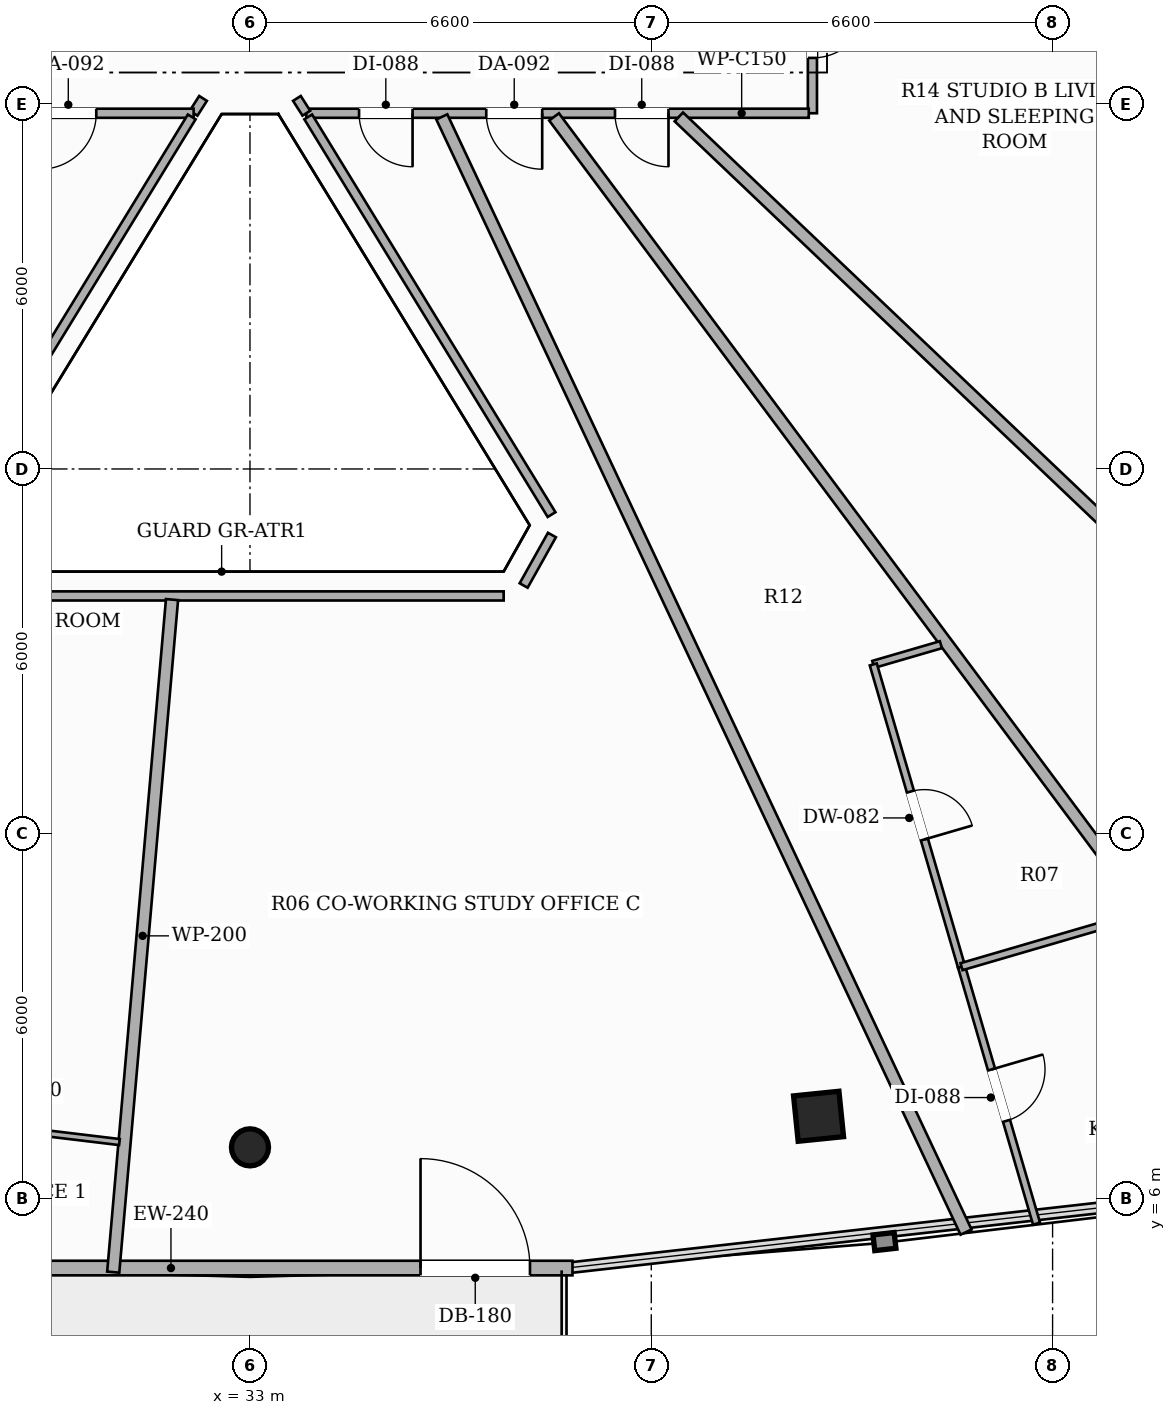
"""IFC4 building model, lengths in metres.
Left out: names, types, materials, properties, quantities, classifications, styles, units other than length and angle.
Written with IfcOpenShell. Run it as: python <this file> out.ifc"""

import sys

from ifc_helpers import new_model, si_unit, direction, frame, frame_2d, origin, origin_2d, place, context, subcontext, project, spatial, rectangle, hollow_rectangle, hollow_circle, extrude, element, fill, save


model = new_model("IFC4")
c1 = context("Model", 3, precision=1e-05, world=origin(), true_north=direction((0.0, 1.0)))
c2 = subcontext(c1, "Body", "Model", "MODEL_VIEW")
j1 = project(units=[si_unit("LENGTHUNIT", "METRE"), si_unit("PLANEANGLEUNIT", "RADIAN")], contexts=[c1])
p1 = place(None, origin())
s1 = spatial("IfcSite", under=j1, at=p1, CompositionType="ELEMENT")
p2 = place(p1, origin())
s2 = spatial("IfcBuilding", under=s1, at=p2, CompositionType="ELEMENT")
p3 = place(p2, frame((0.0, 0.0, 222.8)))
s3 = spatial("IfcBuildingStorey", under=s2, at=p3, CompositionType="ELEMENT", Elevation=222.8)
p4 = place(p3, frame((33.0, 6.844, 0.0), z_axis=(0.0, 0.0, 1.0), x_axis=(1.0, 0.0, 0.0)))
e1 = element("IfcColumn", 1, at=p4, inside=s3, PredefinedType="COLUMN", context=c2, shape_type="SweptSolid", body=[
    extrude(hollow_circle(Radius=0.305, WallThickness=0.016, at=origin_2d()), origin(), (0.0, 0.0, 1.0), 3.3),
])
p5 = place(p3, frame((42.351, 7.355, 0.0), z_axis=(0.0, 0.0, 1.0), x_axis=(0.994880708829, 0.101056297183, 0.0)))
e2 = element("IfcColumn", 2, at=p5, inside=s3, PredefinedType="COLUMN", context=c2, shape_type="SweptSolid", body=[
    extrude(hollow_rectangle(XDim=0.75, YDim=0.75, WallThickness=0.025, at=origin_2d()), origin(), (0.0, 0.0, 1.0), 3.3),
])
p6 = place(p3, frame((27.696, 4.859, 0.0), z_axis=(0.0, 0.0, 1.0), x_axis=(1.0, 0.0, 0.0)))
e3 = element("IfcWall", 3, at=p6, inside=s3, PredefinedType="SOLIDWALL", context=c2, shape_type="SweptSolid", body=[
    extrude(rectangle(XDim=10.608, YDim=0.24, at=frame_2d((5.304, 0.0))), origin(), (0.0, 0.0, 1.0), 2.624),
])
p7 = place(p6, frame((8.109, 0.0, 0.0)))
e4 = element("IfcOpeningElement", 4, at=p7, cuts=e3, PredefinedType="OPENING", context=c2, shape_type="SweptSolid", body=[
    extrude(rectangle(XDim=1.8, YDim=2.2, at=frame_2d((0.9, 1.1))), frame((0.0, 0.13, 0.0), z_axis=(0.0, -1.0, 0.0), x_axis=(1.0, 0.0, 0.0)), (0.0, 0.0, 1.0), 0.26),
])
p8 = place(p3, frame((32.228, 24.094, 0.0), z_axis=(0.0, 0.0, 1.0), x_axis=(-0.53643811989, -0.843939656331, 0.0)))
e5 = element("IfcWall", 5, at=p8, inside=s3, PredefinedType="PARTITIONING", context=c2, shape_type="SweptSolid", body=[
    extrude(rectangle(XDim=0.289, YDim=0.15, at=frame_2d((0.145, 0.0))), origin(), (0.0, 0.0, 1.0), 3.06),
])
p9 = place(p3, frame((32.073, 23.85, 0.0), z_axis=(0.0, 0.0, 1.0), x_axis=(-1.0, 0.0, 0.0)))
e6 = element("IfcWall", 6, at=p9, inside=s3, PredefinedType="PARTITIONING", context=c2, shape_type="SweptSolid", body=[
    extrude(rectangle(XDim=8.423, YDim=0.15, at=frame_2d((4.211, 0.0))), origin(), (0.0, 0.0, 1.0), 2.565),
])
p10 = place(p9, frame((1.601, 0.0, 0.0)))
e7 = element("IfcOpeningElement", 7, at=p10, cuts=e6, PredefinedType="OPENING", context=c2, shape_type="SweptSolid", body=[
    extrude(rectangle(XDim=0.92, YDim=2.15, at=frame_2d((0.46, 1.075))), frame((0.0, 0.085, 0.0), z_axis=(0.0, -1.0, 0.0), x_axis=(1.0, 0.0, 0.0)), (0.0, 0.0, 1.0), 0.17),
])
p11 = place(p9, frame((4.841, 0.0, 0.0)))
e8 = element("IfcOpeningElement", 8, at=p11, cuts=e6, PredefinedType="OPENING", context=c2, shape_type="SweptSolid", body=[
    extrude(rectangle(XDim=0.88, YDim=2.1, at=frame_2d((0.44, 1.05))), frame((0.0, 0.085, 0.0), z_axis=(0.0, -1.0, 0.0), x_axis=(1.0, 0.0, 0.0)), (0.0, 0.0, 1.0), 0.17),
])
p12 = place(p3, frame((42.25, 26.59, 0.0), z_axis=(0.0, 0.0, 1.0), x_axis=(0.0, -1.0, 0.0)))
e9 = element("IfcWall", 9, at=p12, inside=s3, PredefinedType="PARTITIONING", context=c2, shape_type="SweptSolid", body=[
    extrude(rectangle(XDim=2.74, YDim=0.15, at=frame_2d((1.37, 0.0))), origin(), (0.0, 0.0, 1.0), 2.773),
])
p13 = place(p12, frame((0.91, 0.0, 0.0)))
e10 = element("IfcOpeningElement", 10, at=p13, cuts=e9, PredefinedType="OPENING", context=c2, shape_type="SweptSolid", body=[
    extrude(rectangle(XDim=0.92, YDim=2.15, at=frame_2d((0.46, 1.075))), frame((0.0, 0.085, 0.0), z_axis=(0.0, -1.0, 0.0), x_axis=(1.0, 0.0, 0.0)), (0.0, 0.0, 1.0), 0.17),
])
p14 = place(p3, frame((42.19, 23.85, 0.0), z_axis=(0.0, 0.0, 1.0), x_axis=(-1.0, 0.0, 0.0)))
e11 = element("IfcWall", 11, at=p14, inside=s3, PredefinedType="PARTITIONING", context=c2, shape_type="SweptSolid", body=[
    extrude(rectangle(XDim=8.263, YDim=0.15, at=frame_2d((4.131, 0.0))), origin(), (0.0, 0.0, 1.0), 2.565),
])
p15 = place(p14, frame((6.516, 0.0, 0.0)))
e12 = element("IfcOpeningElement", 12, at=p15, cuts=e11, PredefinedType="OPENING", context=c2, shape_type="SweptSolid", body=[
    extrude(rectangle(XDim=0.88, YDim=2.1, at=frame_2d((0.44, 1.05))), frame((0.0, 0.085, 0.0), z_axis=(0.0, -1.0, 0.0), x_axis=(1.0, 0.0, 0.0)), (0.0, 0.0, 1.0), 0.17),
])
p16 = place(p14, frame((2.307, 0.0, 0.0)))
e13 = element("IfcOpeningElement", 13, at=p16, cuts=e11, PredefinedType="OPENING", context=c2, shape_type="SweptSolid", body=[
    extrude(rectangle(XDim=0.88, YDim=2.1, at=frame_2d((0.44, 1.05))), frame((0.0, 0.085, 0.0), z_axis=(0.0, -1.0, 0.0), x_axis=(1.0, 0.0, 0.0)), (0.0, 0.0, 1.0), 0.17),
])
p17 = place(p14, frame((4.384, 0.0, 0.0)))
e14 = element("IfcOpeningElement", 14, at=p17, cuts=e11, PredefinedType="OPENING", context=c2, shape_type="SweptSolid", body=[
    extrude(rectangle(XDim=0.92, YDim=2.15, at=frame_2d((0.46, 1.075))), frame((0.0, 0.085, 0.0), z_axis=(0.0, -1.0, 0.0), x_axis=(1.0, 0.0, 0.0)), (0.0, 0.0, 1.0), 0.17),
])
p18 = place(p3, frame((33.927, 23.851, 0.0), z_axis=(0.0, 0.0, 1.0), x_axis=(-0.537971414128, 0.84296308198, 0.0)))
e15 = element("IfcWall", 15, at=p18, inside=s3, PredefinedType="PARTITIONING", context=c2, shape_type="SweptSolid", body=[
    extrude(rectangle(XDim=0.288, YDim=0.15, at=frame_2d((0.144, 0.0))), origin(), (0.0, 0.0, 1.0), 3.06),
])
p19 = place(p3, frame((33.958, 23.79, 0.0), z_axis=(0.0, 0.0, 1.0), x_axis=(0.521949656317, -0.852976292912, 0.0)))
e16 = element("IfcWall", 16, at=p19, inside=s3, PredefinedType="PARTITIONING", context=c2, shape_type="SweptSolid", body=[
    extrude(rectangle(XDim=7.667, YDim=0.15, at=frame_2d((3.833, 0.0))), origin(), (0.0, 0.0, 1.0), 2.773),
])
p20 = place(p3, frame((37.966, 16.914, 0.0), z_axis=(0.0, 0.0, 1.0), x_axis=(-0.48879868802, -0.872396608539, 0.0)))
e17 = element("IfcWall", 17, at=p20, inside=s3, PredefinedType="PARTITIONING", context=c2, shape_type="SweptSolid", body=[
    extrude(rectangle(XDim=0.951, YDim=0.15, at=frame_2d((0.476, 0.0))), origin(), (0.0, 0.0, 1.0), 3.06),
])
p21 = place(p3, frame((37.172, 15.912, 0.0), z_axis=(0.0, 0.0, 1.0), x_axis=(-1.0, 0.0, 0.0)))
e18 = element("IfcWall", 18, at=p21, inside=s3, PredefinedType="PARTITIONING", context=c2, shape_type="SweptSolid", body=[
    extrude(rectangle(XDim=8.344, YDim=0.15, at=frame_2d((4.172, 0.0))), origin(), (0.0, 0.0, 1.0), 2.773),
])
p22 = place(p3, frame((28.04, 17.25, 0.0), z_axis=(0.0, 0.0, 1.0), x_axis=(0.521949656317, 0.852976292912, 0.0)))
e19 = element("IfcWall", 19, at=p22, inside=s3, PredefinedType="PARTITIONING", context=c2, shape_type="SweptSolid", body=[
    extrude(rectangle(XDim=7.667, YDim=0.15, at=frame_2d((3.833, 0.0))), origin(), (0.0, 0.0, 1.0), 2.773),
])
p23 = place(p3, frame((31.718, 15.852, 0.0), z_axis=(0.0, 0.0, 1.0), x_axis=(-0.087103117533, -0.996199300801, 0.0)))
e20 = element("IfcWall", 20, at=p23, inside=s3, PredefinedType="PARTITIONING", context=c2, shape_type="SweptSolid", body=[
    extrude(rectangle(XDim=11.102, YDim=0.2, at=frame_2d((5.551, 0.0))), origin(), (0.0, 0.0, 1.0), 2.492),
])
p24 = place(p3, frame((56.059, 8.563, 0.0), z_axis=(0.0, 0.0, 1.0), x_axis=(-0.724518891706, 0.689254942355, 0.0)))
e21 = element("IfcWall", 21, at=p24, inside=s3, PredefinedType="PARTITIONING", context=c2, shape_type="SweptSolid", body=[
    extrude(rectangle(XDim=22.092, YDim=0.2, at=frame_2d((11.046, 0.0))), origin(), (0.0, 0.0, 1.0), 2.492),
])
p25 = place(p3, frame((36.155, 23.79, 0.0), z_axis=(0.0, 0.0, 1.0), x_axis=(0.425451226132, -0.90498135571, 0.0)))
e22 = element("IfcWall", 22, at=p25, inside=s3, PredefinedType="PARTITIONING", context=c2, shape_type="SweptSolid", body=[
    extrude(rectangle(XDim=20.266, YDim=0.2, at=frame_2d((10.133, 0.0))), origin(), (0.0, 0.0, 1.0), 2.492),
])
p26 = place(p3, frame((51.072, 6.251, 0.0), z_axis=(0.0, 0.0, 1.0), x_axis=(-0.59756139073, 0.801823162742, 0.0)))
e23 = element("IfcWall", 23, at=p26, inside=s3, PredefinedType="PARTITIONING", context=c2, shape_type="SweptSolid", body=[
    extrude(rectangle(XDim=21.874, YDim=0.2, at=frame_2d((10.937, 0.0))), origin(), (0.0, 0.0, 1.0), 2.492),
])
p27 = place(p3, frame((30.853, 6.931, 0.0), z_axis=(0.0, 0.0, 1.0), x_axis=(-0.992840033501, 0.119451529409, 0.0)))
e24 = element("IfcWall", 24, at=p27, inside=s3, PredefinedType="PARTITIONING", context=c2, shape_type="SweptSolid", body=[
    extrude(rectangle(XDim=7.417, YDim=0.1, at=frame_2d((3.708, 0.0))), origin(), (0.0, 0.0, 1.0), 2.492),
])
p28 = place(p27, frame((3.269, 0.0, 0.0)))
e25 = element("IfcOpeningElement", 25, at=p28, cuts=e24, PredefinedType="OPENING", context=c2, shape_type="SweptSolid", body=[
    extrude(rectangle(XDim=0.88, YDim=2.1, at=frame_2d((0.44, 1.05))), frame((0.0, 0.06, 0.0), z_axis=(0.0, -1.0, 0.0), x_axis=(1.0, 0.0, 0.0)), (0.0, 0.0, 1.0), 0.12),
])
p29 = place(p3, frame((44.363, 15.11, 0.0), z_axis=(0.0, 0.0, 1.0), x_axis=(-0.960030681494, -0.279894784857, 0.0)))
e26 = element("IfcWall", 26, at=p29, inside=s3, PredefinedType="PARTITIONING", context=c2, shape_type="SweptSolid", body=[
    extrude(rectangle(XDim=1.158, YDim=0.12, at=frame_2d((0.579, 0.0))), origin(), (0.0, 0.0, 1.0), 2.773),
])
p30 = place(p3, frame((43.251, 14.786, 0.0), z_axis=(0.0, 0.0, 1.0), x_axis=(0.280190088139, -0.959944537204, 0.0)))
e27 = element("IfcWall", 27, at=p30, inside=s3, PredefinedType="PARTITIONING", context=c2, shape_type="SweptSolid", body=[
    extrude(rectangle(XDim=5.178, YDim=0.12, at=frame_2d((2.589, 0.0))), origin(), (0.0, 0.0, 1.0), 3.06),
])
p31 = place(p30, frame((2.179, 0.0, 0.0)))
e28 = element("IfcOpeningElement", 28, at=p31, cuts=e27, PredefinedType="OPENING", context=c2, shape_type="SweptSolid", body=[
    extrude(rectangle(XDim=0.82, YDim=2.1, at=frame_2d((0.41, 1.05))), frame((0.0, 0.07, 0.0), z_axis=(0.0, -1.0, 0.0), x_axis=(1.0, 0.0, 0.0)), (0.0, 0.0, 1.0), 0.14),
])
p32 = place(p3, frame((44.702, 9.815, 0.0), z_axis=(0.0, 0.0, 1.0), x_axis=(0.28033432121, -0.959902426474, 0.0)))
e29 = element("IfcWall", 29, at=p32, inside=s3, PredefinedType="PARTITIONING", context=c2, shape_type="SweptSolid", body=[
    extrude(rectangle(XDim=4.402, YDim=0.12, at=frame_2d((2.201, 0.0))), origin(), (0.0, 0.0, 1.0), 2.492),
])
p33 = place(p32, frame((1.761, 0.0, 0.0)))
e30 = element("IfcOpeningElement", 30, at=p33, cuts=e29, PredefinedType="OPENING", context=c2, shape_type="SweptSolid", body=[
    extrude(rectangle(XDim=0.88, YDim=2.1, at=frame_2d((0.44, 1.05))), frame((0.0, 0.07, 0.0), z_axis=(0.0, -1.0, 0.0), x_axis=(1.0, 0.0, 0.0)), (0.0, 0.0, 1.0), 0.14),
])
p34 = place(p3, frame((47.665, 10.68, 0.0), z_axis=(0.0, 0.0, 1.0), x_axis=(-0.959935309068, -0.280221702235, 0.0)))
e31 = element("IfcWall", 31, at=p34, inside=s3, PredefinedType="PARTITIONING", context=c2, shape_type="SweptSolid", body=[
    extrude(rectangle(XDim=3.087, YDim=0.12, at=frame_2d((1.543, 0.0))), origin(), (0.0, 0.0, 1.0), 2.773),
])
p35 = place(p7, origin())
e32 = element("IfcDoor", 32, at=p35, inside=s3, OperationType="SINGLE_SWING_LEFT", PredefinedType="DOOR", context=c2, shape_type="SweptSolid", body=[
    extrude(rectangle(XDim=1.8, YDim=2.2, at=frame_2d((0.9, 1.1))), frame((0.0, 0.025, 0.0), z_axis=(0.0, -1.0, 0.0), x_axis=(1.0, 0.0, 0.0)), (0.0, 0.0, 1.0), 0.05),
])
fill(e4, e32)
p36 = place(p10, origin())
e33 = element("IfcDoor", 33, at=p36, inside=s3, OperationType="SINGLE_SWING_RIGHT", PredefinedType="DOOR", context=c2, shape_type="SweptSolid", body=[
    extrude(rectangle(XDim=0.92, YDim=2.15, at=frame_2d((0.46, 1.075))), frame((0.0, 0.025, 0.0), z_axis=(0.0, -1.0, 0.0), x_axis=(1.0, 0.0, 0.0)), (0.0, 0.0, 1.0), 0.05),
])
fill(e7, e33)
p37 = place(p13, origin())
e34 = element("IfcDoor", 34, at=p37, inside=s3, OperationType="SINGLE_SWING_LEFT", PredefinedType="DOOR", context=c2, shape_type="SweptSolid", body=[
    extrude(rectangle(XDim=0.92, YDim=2.15, at=frame_2d((0.46, 1.075))), frame((0.0, 0.025, 0.0), z_axis=(0.0, -1.0, 0.0), x_axis=(1.0, 0.0, 0.0)), (0.0, 0.0, 1.0), 0.05),
])
fill(e10, e34)
p38 = place(p15, origin())
e35 = element("IfcDoor", 35, at=p38, inside=s3, OperationType="SINGLE_SWING_LEFT", PredefinedType="DOOR", context=c2, shape_type="SweptSolid", body=[
    extrude(rectangle(XDim=0.88, YDim=2.1, at=frame_2d((0.44, 1.05))), frame((0.0, 0.025, 0.0), z_axis=(0.0, -1.0, 0.0), x_axis=(1.0, 0.0, 0.0)), (0.0, 0.0, 1.0), 0.05),
])
fill(e12, e35)
p39 = place(p16, origin())
e36 = element("IfcDoor", 36, at=p39, inside=s3, OperationType="SINGLE_SWING_LEFT", PredefinedType="DOOR", context=c2, shape_type="SweptSolid", body=[
    extrude(rectangle(XDim=0.88, YDim=2.1, at=frame_2d((0.44, 1.05))), frame((0.0, 0.025, 0.0), z_axis=(0.0, -1.0, 0.0), x_axis=(1.0, 0.0, 0.0)), (0.0, 0.0, 1.0), 0.05),
])
fill(e13, e36)
p40 = place(p17, origin())
e37 = element("IfcDoor", 37, at=p40, inside=s3, OperationType="SINGLE_SWING_LEFT", PredefinedType="DOOR", context=c2, shape_type="SweptSolid", body=[
    extrude(rectangle(XDim=0.92, YDim=2.15, at=frame_2d((0.46, 1.075))), frame((0.0, 0.025, 0.0), z_axis=(0.0, -1.0, 0.0), x_axis=(1.0, 0.0, 0.0)), (0.0, 0.0, 1.0), 0.05),
])
fill(e14, e37)
p41 = place(p31, origin())
e38 = element("IfcDoor", 38, at=p41, inside=s3, OperationType="SINGLE_SWING_RIGHT", PredefinedType="DOOR", context=c2, shape_type="SweptSolid", body=[
    extrude(rectangle(XDim=0.82, YDim=2.1, at=frame_2d((0.41, 1.05))), frame((0.0, 0.025, 0.0), z_axis=(0.0, -1.0, 0.0), x_axis=(1.0, 0.0, 0.0)), (0.0, 0.0, 1.0), 0.05),
])
fill(e28, e38)
p42 = place(p33, origin())
e39 = element("IfcDoor", 39, at=p42, inside=s3, OperationType="SINGLE_SWING_LEFT", PredefinedType="DOOR", context=c2, shape_type="SweptSolid", body=[
    extrude(rectangle(XDim=0.88, YDim=2.1, at=frame_2d((0.44, 1.05))), frame((0.0, 0.025, 0.0), z_axis=(0.0, -1.0, 0.0), x_axis=(1.0, 0.0, 0.0)), (0.0, 0.0, 1.0), 0.05),
])
fill(e30, e39)
save(model, sys.argv[1])
